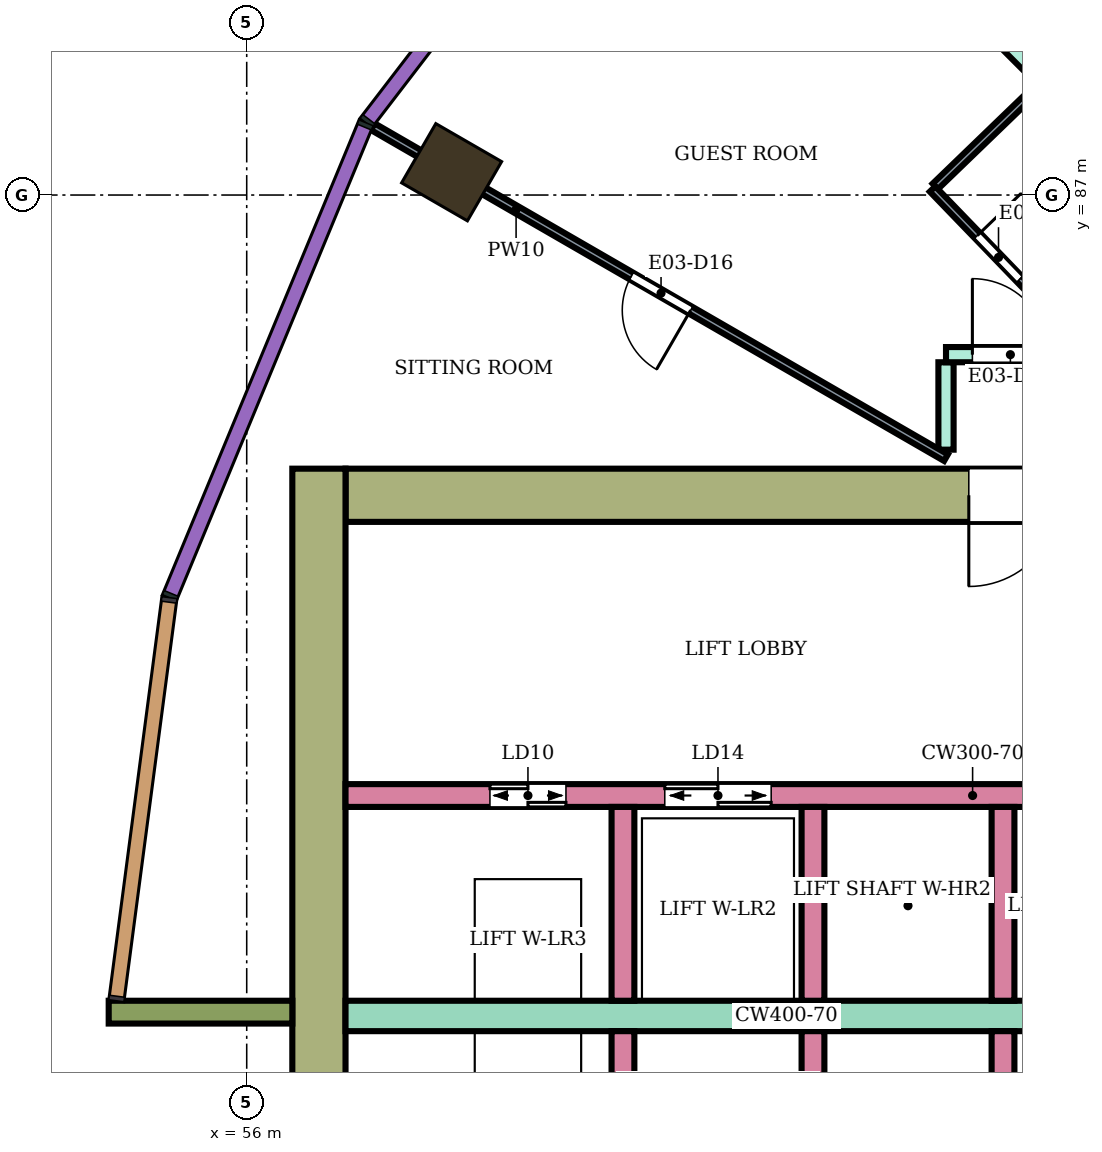
"""IFC4 building model, lengths in metres.
Left out: names, types, materials, properties, quantities, classifications, styles, units other than length and angle.
Written with IfcOpenShell. Run it as: python <this file> out.ifc"""

import sys

from ifc_helpers import new_model, si_unit, direction, frame, frame_2d, origin, origin_2d, place, context, subcontext, project, spatial, rectangle, extrude, element, fill, save


model = new_model("IFC4")
c1 = context("Model", 3, precision=1e-05, world=origin(), true_north=direction((0.0, 1.0)))
c2 = subcontext(c1, "Body", "Model", "MODEL_VIEW")
j1 = project(units=[si_unit("LENGTHUNIT", "METRE"), si_unit("PLANEANGLEUNIT", "RADIAN")], contexts=[c1])
p1 = place(None, origin())
s1 = spatial("IfcSite", under=j1, at=p1, CompositionType="ELEMENT")
p2 = place(p1, origin())
s2 = spatial("IfcBuilding", under=s1, at=p2, CompositionType="ELEMENT")
p3 = place(p2, frame((0.0, 0.0, 141.9)))
s3 = spatial("IfcBuildingStorey", under=s2, at=p3, CompositionType="ELEMENT", Elevation=141.9)
p4 = place(p3, frame((58.696, 87.3, 0.0), z_axis=(0.0, 0.0, 1.0), x_axis=(-0.866025403784, 0.5, 0.0)))
e1 = element("IfcColumn", 1, at=p4, inside=s3, PredefinedType="COLUMN", context=c2, shape_type="SweptSolid", body=[
    extrude(rectangle(XDim=1.0, YDim=0.9, at=origin_2d()), origin(), (0.0, 0.0, 1.0), 3.9),
])
p5 = place(p3, frame((72.1, 83.05, 0.0), z_axis=(0.0, 0.0, 1.0), x_axis=(-1.0, 0.0, 0.0)))
e2 = element("IfcWall", 2, at=p5, inside=s3, PredefinedType="SHEAR", context=c2, shape_type="SweptSolid", body=[
    extrude(rectangle(XDim=14.8, YDim=0.7, at=frame_2d((7.4, 0.0))), origin(), (0.0, 0.0, 1.0), 3.58),
])
p6 = place(p5, frame((4.2, 0.0, 0.0)))
e3 = element("IfcOpeningElement", 3, at=p6, cuts=e2, PredefinedType="OPENING", context=c2, shape_type="SweptSolid", body=[
    extrude(rectangle(XDim=2.4, YDim=2.4, at=frame_2d((1.2, 1.2))), frame((0.0, 0.36, 0.0), z_axis=(0.0, -1.0, 0.0), x_axis=(1.0, 0.0, 0.0)), (0.0, 0.0, 1.0), 0.72),
])
p7 = place(p3, frame((56.95, 83.4, 0.0), z_axis=(0.0, 0.0, 1.0), x_axis=(0.0, -1.0, 0.0)))
e4 = element("IfcWall", 4, at=p7, inside=s3, PredefinedType="SHEAR", context=c2, shape_type="SweptSolid", body=[
    extrude(rectangle(XDim=16.8, YDim=0.7, at=frame_2d((8.4, 0.0))), origin(), (0.0, 0.0, 1.0), 3.58),
])
p8 = place(p3, frame((68.3, 76.2, 0.0), z_axis=(0.0, 0.0, 1.0), x_axis=(-1.0, 0.0, 0.0)))
e5 = element("IfcWall", 5, at=p8, inside=s3, PredefinedType="SHEAR", context=c2, shape_type="SweptSolid", body=[
    extrude(rectangle(XDim=11.0, YDim=0.4, at=frame_2d((5.5, 0.0))), origin(), (0.0, 0.0, 1.0), 3.58),
])
p9 = place(p3, frame((68.3, 79.1, 0.0), z_axis=(0.0, 0.0, 1.0), x_axis=(-1.0, 0.0, 0.0)))
e6 = element("IfcWall", 6, at=p9, inside=s3, PredefinedType="SHEAR", context=c2, shape_type="SweptSolid", body=[
    extrude(rectangle(XDim=11.0, YDim=0.3, at=frame_2d((5.5, 0.0))), origin(), (0.0, 0.0, 1.0), 3.58),
])
p10 = place(p9, frame((0.4, 0.0, 0.0)))
e7 = element("IfcOpeningElement", 7, at=p10, cuts=e6, PredefinedType="OPENING", context=c2, shape_type="SweptSolid", body=[
    extrude(rectangle(XDim=1.4, YDim=2.1, at=frame_2d((0.7, 1.05))), frame((0.0, 0.16, 0.0), z_axis=(0.0, -1.0, 0.0), x_axis=(1.0, 0.0, 0.0)), (0.0, 0.0, 1.0), 0.32),
])
p11 = place(p9, frame((5.4, 0.0, 0.0)))
e8 = element("IfcOpeningElement", 8, at=p11, cuts=e6, PredefinedType="OPENING", context=c2, shape_type="SweptSolid", body=[
    extrude(rectangle(XDim=1.4, YDim=2.1, at=frame_2d((0.7, 1.05))), frame((0.0, 0.16, 0.0), z_axis=(0.0, -1.0, 0.0), x_axis=(1.0, 0.0, 0.0)), (0.0, 0.0, 1.0), 0.32),
])
p12 = place(p9, frame((8.1, 0.0, 0.0)))
e9 = element("IfcOpeningElement", 9, at=p12, cuts=e6, PredefinedType="OPENING", context=c2, shape_type="SweptSolid", body=[
    extrude(rectangle(XDim=1.0, YDim=2.1, at=frame_2d((0.5, 1.05))), frame((0.0, 0.16, 0.0), z_axis=(0.0, -1.0, 0.0), x_axis=(1.0, 0.0, 0.0)), (0.0, 0.0, 1.0), 0.32),
])
for number, where, z_axis, x_axis in (
    (10, (65.95, 76.0, 0.0), (0.0, 0.0, 1.0), (0.0, -1.0, 0.0)),
    (11, (63.45, 76.0, 0.0), (0.0, 0.0, 1.0), (0.0, -1.0, 0.0)),
    (12, (60.95, 76.0, 0.0), (0.0, 0.0, 1.0), (0.0, -1.0, 0.0)),
    (13, (65.95, 78.95, 0.0), (0.0, 0.0, 1.0), (0.0, -1.0, 0.0)),
    (14, (63.45, 78.95, 0.0), (0.0, 0.0, 1.0), (0.0, -1.0, 0.0)),
    (15, (60.95, 78.95, 0.0), (0.0, 0.0, 1.0), (0.0, -1.0, 0.0)),
):
    element("IfcWall", number, at=place(p3, frame(where, z_axis=z_axis, x_axis=x_axis)), inside=s3, PredefinedType="SHEAR", context=c2, shape_type="SweptSolid", body=[
        extrude(rectangle(XDim=2.55, YDim=0.3, at=frame_2d((1.275, 0.0))), origin(), (0.0, 0.0, 1.0), 3.58),
    ])
p13 = place(p3, frame((56.6, 76.25, 0.0), z_axis=(0.0, 0.0, 1.0), x_axis=(-1.0, 0.0, 0.0)))
e16 = element("IfcWall", 16, at=p13, inside=s3, PredefinedType="NOTDEFINED", context=c2, shape_type="SweptSolid", body=[
    extrude(rectangle(XDim=2.416, YDim=0.3, at=frame_2d((1.208, 0.0))), origin(), (0.0, 0.0, 1.0), 3.9),
])
p14 = place(p3, frame((63.596, 91.406, 0.0), z_axis=(0.0, 0.0, 1.0), x_axis=(0.706963264491, -0.707250268759, 0.0)))
e17 = element("IfcWall", 17, at=p14, inside=s3, PredefinedType="PARTITIONING", context=c2, shape_type="SweptSolid", body=[
    extrude(rectangle(XDim=6.805, YDim=0.2, at=frame_2d((3.403, 0.0))), origin(), (0.0, 0.0, 1.0), 3.45),
])
p15 = place(p3, frame((65.2, 83.65, 0.0), z_axis=(0.0, 0.0, 1.0), x_axis=(0.0, 1.0, 0.0)))
e18 = element("IfcWall", 18, at=p15, inside=s3, PredefinedType="PARTITIONING", context=c2, shape_type="SweptSolid", body=[
    extrude(rectangle(XDim=1.15, YDim=0.2, at=frame_2d((0.575, 0.0))), origin(), (0.0, 0.0, 1.0), 3.45),
])
p16 = place(p3, frame((65.2, 84.9, 0.0), z_axis=(0.0, 0.0, 1.0), x_axis=(1.0, 0.0, 0.0)))
e19 = element("IfcWall", 19, at=p16, inside=s3, PredefinedType="PARTITIONING", context=c2, shape_type="SweptSolid", body=[
    extrude(rectangle(XDim=1.537, YDim=0.2, at=frame_2d((0.769, 0.0))), origin(), (0.0, 0.0, 1.0), 3.45),
])
p17 = place(p16, frame((0.347, 0.0, 0.0)))
e20 = element("IfcOpeningElement", 20, at=p17, cuts=e19, PredefinedType="OPENING", context=c2, shape_type="SweptSolid", body=[
    extrude(rectangle(XDim=1.0, YDim=2.1, at=frame_2d((0.5, 1.05))), frame((0.0, 0.11, 0.0), z_axis=(0.0, -1.0, 0.0), x_axis=(1.0, 0.0, 0.0)), (0.0, 0.0, 1.0), 0.22),
])
p18 = place(p3, frame((57.659, 87.899, 0.0), z_axis=(0.0, 0.0, 1.0), x_axis=(0.86602264145, -0.500004784474, 0.0)))
e21 = element("IfcWall", 21, at=p18, inside=s3, PredefinedType="PARTITIONING", context=c2, shape_type="SweptSolid", body=[
    extrude(rectangle(XDim=8.708, YDim=0.1, at=frame_2d((4.354, 0.0))), origin(), (0.0, 0.0, 1.0), 3.45),
])
p19 = place(p18, frame((3.929, 0.0, 0.0)))
e22 = element("IfcOpeningElement", 22, at=p19, cuts=e21, PredefinedType="OPENING", context=c2, shape_type="SweptSolid", body=[
    extrude(rectangle(XDim=0.9, YDim=2.1, at=frame_2d((0.45, 1.05))), frame((0.0, 0.06, 0.0), z_axis=(0.0, -1.0, 0.0), x_axis=(1.0, 0.0, 0.0)), (0.0, 0.0, 1.0), 0.12),
])
p20 = place(p3, frame((65.059, 87.114, 0.0), z_axis=(0.0, 0.0, 1.0), x_axis=(0.719653890619, 0.694332973232, 0.0)))
e23 = element("IfcWall", 23, at=p20, inside=s3, PredefinedType="PARTITIONING", context=c2, shape_type="SweptSolid", body=[
    extrude(rectangle(XDim=1.899, YDim=0.1, at=frame_2d((0.95, 0.0))), origin(), (0.0, 0.0, 1.0), 3.45),
])
p21 = place(p3, frame((65.023, 87.079, 0.0), z_axis=(0.0, 0.0, 1.0), x_axis=(0.694287838235, -0.719697434815, 0.0)))
e24 = element("IfcWall", 24, at=p21, inside=s3, PredefinedType="PARTITIONING", context=c2, shape_type="SweptSolid", body=[
    extrude(rectangle(XDim=2.7, YDim=0.1, at=frame_2d((1.35, 0.0))), origin(), (0.0, 0.0, 1.0), 3.45),
])
p22 = place(p21, frame((0.85, 0.0, 0.0)))
e25 = element("IfcOpeningElement", 25, at=p22, cuts=e24, PredefinedType="OPENING", context=c2, shape_type="SweptSolid", body=[
    extrude(rectangle(XDim=0.8, YDim=2.1, at=frame_2d((0.4, 1.05))), frame((0.0, 0.06, 0.0), z_axis=(0.0, -1.0, 0.0), x_axis=(1.0, 0.0, 0.0)), (0.0, 0.0, 1.0), 0.12),
])
p23 = place(p17, origin())
e26 = element("IfcDoor", 26, at=p23, inside=s3, OperationType="SINGLE_SWING_LEFT", PredefinedType="DOOR", context=c2, shape_type="SweptSolid", body=[
    extrude(rectangle(XDim=1.0, YDim=2.1, at=frame_2d((0.5, 1.05))), frame((0.0, 0.025, 0.0), z_axis=(0.0, -1.0, 0.0), x_axis=(1.0, 0.0, 0.0)), (0.0, 0.0, 1.0), 0.05),
])
fill(e20, e26)
p24 = place(p22, origin())
e27 = element("IfcDoor", 27, at=p24, inside=s3, OperationType="SINGLE_SWING_LEFT", PredefinedType="DOOR", context=c2, shape_type="SweptSolid", body=[
    extrude(rectangle(XDim=0.8, YDim=2.1, at=frame_2d((0.4, 1.05))), frame((0.0, 0.025, 0.0), z_axis=(0.0, -1.0, 0.0), x_axis=(1.0, 0.0, 0.0)), (0.0, 0.0, 1.0), 0.05),
])
fill(e25, e27)
p25 = place(p19, frame((0.9, 0.0, 0.0), z_axis=(0.0, 0.0, 1.0), x_axis=(-1.0, 0.0, 0.0)))
e28 = element("IfcDoor", 28, at=p25, inside=s3, OperationType="SINGLE_SWING_LEFT", PredefinedType="DOOR", context=c2, shape_type="SweptSolid", body=[
    extrude(rectangle(XDim=0.9, YDim=2.1, at=frame_2d((0.45, 1.05))), frame((0.0, 0.025, 0.0), z_axis=(0.0, -1.0, 0.0), x_axis=(1.0, 0.0, 0.0)), (0.0, 0.0, 1.0), 0.05),
])
fill(e22, e28)
p26 = place(p11, origin())
e29 = element("IfcDoor", 29, at=p26, inside=s3, OperationType="DOUBLE_DOOR_SLIDING", PredefinedType="DOOR", context=c2, shape_type="SweptSolid", body=[
    extrude(rectangle(XDim=1.4, YDim=2.1, at=frame_2d((0.7, 1.05))), frame((0.0, 0.025, 0.0), z_axis=(0.0, -1.0, 0.0), x_axis=(1.0, 0.0, 0.0)), (0.0, 0.0, 1.0), 0.05),
])
fill(e8, e29)
p27 = place(p12, origin())
e30 = element("IfcDoor", 30, at=p27, inside=s3, OperationType="DOUBLE_DOOR_SLIDING", PredefinedType="DOOR", context=c2, shape_type="SweptSolid", body=[
    extrude(rectangle(XDim=1.0, YDim=2.1, at=frame_2d((0.5, 1.05))), frame((0.0, 0.025, 0.0), z_axis=(0.0, -1.0, 0.0), x_axis=(1.0, 0.0, 0.0)), (0.0, 0.0, 1.0), 0.05),
])
fill(e9, e30)
p28 = place(p6, origin())
e31 = element("IfcDoor", 31, at=p28, inside=s3, OperationType="DOUBLE_DOOR_SINGLE_SWING", PredefinedType="DOOR", context=c2, shape_type="SweptSolid", body=[
    extrude(rectangle(XDim=2.4, YDim=2.4, at=frame_2d((1.2, 1.2))), frame((0.0, 0.025, 0.0), z_axis=(0.0, -1.0, 0.0), x_axis=(1.0, 0.0, 0.0)), (0.0, 0.0, 1.0), 0.05),
])
fill(e3, e31)
save(model, sys.argv[1])
